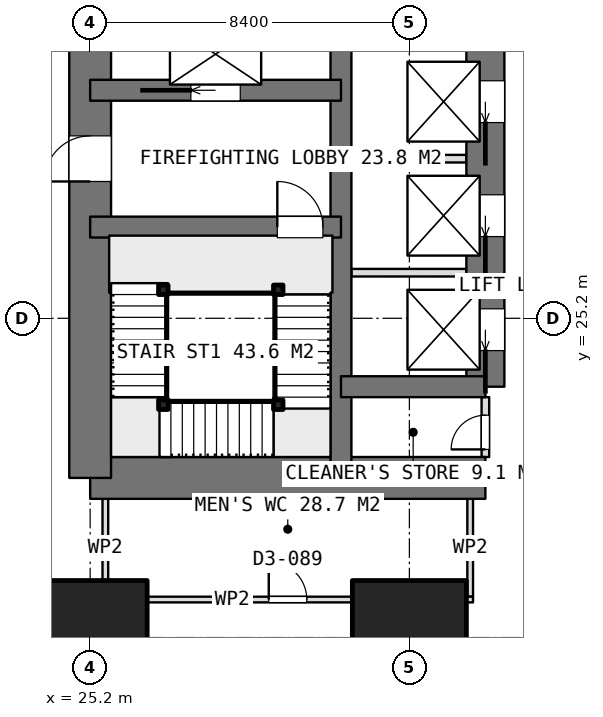
"""IFC4 building model, lengths in metres.
Left out: names, types, materials, properties, quantities, classifications, styles, units other than length and angle.
Written with IfcOpenShell. Run it as: python <this file> out.ifc"""

import sys

from ifc_helpers import new_model, si_unit, direction, frame, frame_2d, origin, origin_2d, place, context, subcontext, project, spatial, rectangle, extrude, element, fill, save


model = new_model("IFC4")
c1 = context("Model", 3, precision=1e-05, world=origin(), true_north=direction((0.0, 1.0)))
c2 = subcontext(c1, "Body", "Model", "MODEL_VIEW")
j1 = project(units=[si_unit("LENGTHUNIT", "METRE"), si_unit("PLANEANGLEUNIT", "RADIAN")], contexts=[c1])
p1 = place(None, origin())
s1 = spatial("IfcSite", under=j1, at=p1, CompositionType="ELEMENT")
p2 = place(p1, origin())
s2 = spatial("IfcBuilding", under=s1, at=p2, CompositionType="ELEMENT")
p3 = place(p2, frame((0.0, 0.0, 81.65)))
s3 = spatial("IfcBuildingStorey", under=s2, at=p3, CompositionType="ELEMENT", Elevation=81.65)
p4 = place(p3, frame((25.2, 21.0, 0.0), z_axis=(0.0, 0.0, 1.0), x_axis=(1.0, 0.0, 0.0)))
e1 = element("IfcWall", 1, at=p4, inside=s3, PredefinedType="SHEAR", context=c2, shape_type="SweptSolid", body=[
    extrude(rectangle(XDim=10.4, YDim=1.1, at=frame_2d((5.2, 0.0))), origin(), (0.0, 0.0, 1.0), 3.75),
])
p5 = place(p3, frame((25.2, 21.0, 0.0), z_axis=(0.0, 0.0, 1.0), x_axis=(0.0, 1.0, 0.0)))
e2 = element("IfcWall", 2, at=p5, inside=s3, PredefinedType="SHEAR", context=c2, shape_type="SweptSolid", body=[
    extrude(rectangle(XDim=25.2, YDim=1.1, at=frame_2d((12.6, 0.0))), origin(), (0.0, 0.0, 1.0), 3.75),
])
p6 = place(p5, frame((7.8, 0.0, 0.0)))
e3 = element("IfcOpeningElement", 3, at=p6, cuts=e2, PredefinedType="OPENING", context=c2, shape_type="SweptSolid", body=[
    extrude(rectangle(XDim=1.2, YDim=2.1, at=frame_2d((0.6, 1.05))), frame((0.0, 0.56, 0.0), z_axis=(0.0, -1.0, 0.0), x_axis=(1.0, 0.0, 0.0)), (0.0, 0.0, 1.0), 1.12),
])
p7 = place(p5, frame((14.25, 0.0, 0.0)))
e4 = element("IfcOpeningElement", 4, at=p7, cuts=e2, PredefinedType="OPENING", context=c2, shape_type="SweptSolid", body=[
    extrude(rectangle(XDim=0.9, YDim=2.1, at=frame_2d((0.45, 1.05))), frame((0.0, 0.56, 0.0), z_axis=(0.0, -1.0, 0.0), x_axis=(1.0, 0.0, 0.0)), (0.0, 0.0, 1.0), 1.12),
])
p8 = place(p5, frame((16.85, 0.0, 0.0)))
e5 = element("IfcOpeningElement", 5, at=p8, cuts=e2, PredefinedType="OPENING", context=c2, shape_type="SweptSolid", body=[
    extrude(rectangle(XDim=0.9, YDim=2.1, at=frame_2d((0.45, 1.05))), frame((0.0, 0.56, 0.0), z_axis=(0.0, -1.0, 0.0), x_axis=(1.0, 0.0, 0.0)), (0.0, 0.0, 1.0), 1.12),
])
p9 = place(p5, frame((19.075, 0.0, 0.0)))
e6 = element("IfcOpeningElement", 6, at=p9, cuts=e2, PredefinedType="OPENING", context=c2, shape_type="SweptSolid", body=[
    extrude(rectangle(XDim=1.2, YDim=2.1, at=frame_2d((0.6, 1.05))), frame((0.0, 0.56, 0.0), z_axis=(0.0, -1.0, 0.0), x_axis=(1.0, 0.0, 0.0)), (0.0, 0.0, 1.0), 1.12),
])
p10 = place(p3, frame((31.8, 21.0, 0.0), z_axis=(0.0, 0.0, 1.0), x_axis=(0.0, 1.0, 0.0)))
e7 = element("IfcWall", 7, at=p10, inside=s3, PredefinedType="SHEAR", context=c2, shape_type="SweptSolid", body=[
    extrude(rectangle(XDim=25.2, YDim=0.55, at=frame_2d((12.6, 0.0))), origin(), (0.0, 0.0, 1.0), 3.75),
])
p11 = place(p3, frame((35.6, 23.4, 0.0), z_axis=(0.0, 0.0, 1.0), x_axis=(0.0, 1.0, 0.0)))
e8 = element("IfcWall", 8, at=p11, inside=s3, PredefinedType="SHEAR", context=c2, shape_type="SweptSolid", body=[
    extrude(rectangle(XDim=18.0, YDim=1.0, at=frame_2d((9.0, 0.0))), origin(), (0.0, 0.0, 1.0), 3.75),
])
p12 = place(p11, frame((0.95, 0.0, 0.0)))
e9 = element("IfcOpeningElement", 9, at=p12, cuts=e8, PredefinedType="OPENING", context=c2, shape_type="SweptSolid", body=[
    extrude(rectangle(XDim=1.1, YDim=2.1, at=frame_2d((0.55, 1.05))), frame((0.0, 0.51, 0.0), z_axis=(0.0, -1.0, 0.0), x_axis=(1.0, 0.0, 0.0)), (0.0, 0.0, 1.0), 1.02),
])
p13 = place(p11, frame((3.95, 0.0, 0.0)))
e10 = element("IfcOpeningElement", 10, at=p13, cuts=e8, PredefinedType="OPENING", context=c2, shape_type="SweptSolid", body=[
    extrude(rectangle(XDim=1.1, YDim=2.1, at=frame_2d((0.55, 1.05))), frame((0.0, 0.51, 0.0), z_axis=(0.0, -1.0, 0.0), x_axis=(1.0, 0.0, 0.0)), (0.0, 0.0, 1.0), 1.02),
])
p14 = place(p11, frame((6.95, 0.0, 0.0)))
e11 = element("IfcOpeningElement", 11, at=p14, cuts=e8, PredefinedType="OPENING", context=c2, shape_type="SweptSolid", body=[
    extrude(rectangle(XDim=1.1, YDim=2.1, at=frame_2d((0.55, 1.05))), frame((0.0, 0.51, 0.0), z_axis=(0.0, -1.0, 0.0), x_axis=(1.0, 0.0, 0.0)), (0.0, 0.0, 1.0), 1.02),
])
p15 = place(p11, frame((9.95, 0.0, 0.0)))
e12 = element("IfcOpeningElement", 12, at=p15, cuts=e8, PredefinedType="OPENING", context=c2, shape_type="SweptSolid", body=[
    extrude(rectangle(XDim=1.1, YDim=2.1, at=frame_2d((0.55, 1.05))), frame((0.0, 0.51, 0.0), z_axis=(0.0, -1.0, 0.0), x_axis=(1.0, 0.0, 0.0)), (0.0, 0.0, 1.0), 1.02),
])
p16 = place(p11, frame((12.95, 0.0, 0.0)))
e13 = element("IfcOpeningElement", 13, at=p16, cuts=e8, PredefinedType="OPENING", context=c2, shape_type="SweptSolid", body=[
    extrude(rectangle(XDim=1.1, YDim=2.1, at=frame_2d((0.55, 1.05))), frame((0.0, 0.51, 0.0), z_axis=(0.0, -1.0, 0.0), x_axis=(1.0, 0.0, 0.0)), (0.0, 0.0, 1.0), 1.02),
])
p17 = place(p11, frame((15.95, 0.0, 0.0)))
e14 = element("IfcOpeningElement", 14, at=p17, cuts=e8, PredefinedType="OPENING", context=c2, shape_type="SweptSolid", body=[
    extrude(rectangle(XDim=1.1, YDim=2.1, at=frame_2d((0.55, 1.05))), frame((0.0, 0.51, 0.0), z_axis=(0.0, -1.0, 0.0), x_axis=(1.0, 0.0, 0.0)), (0.0, 0.0, 1.0), 1.02),
])
p18 = place(p3, frame((31.8, 23.4, 0.0), z_axis=(0.0, 0.0, 1.0), x_axis=(1.0, 0.0, 0.0)))
e15 = element("IfcWall", 15, at=p18, inside=s3, PredefinedType="SHEAR", context=c2, shape_type="SweptSolid", body=[
    extrude(rectangle(XDim=3.8, YDim=0.55, at=frame_2d((1.9, 0.0))), origin(), (0.0, 0.0, 1.0), 3.75),
])
p19 = place(p3, frame((25.2, 27.6, 0.0), z_axis=(0.0, 0.0, 1.0), x_axis=(1.0, 0.0, 0.0)))
e16 = element("IfcWall", 16, at=p19, inside=s3, PredefinedType="SHEAR", context=c2, shape_type="SweptSolid", body=[
    extrude(rectangle(XDim=6.6, YDim=0.55, at=frame_2d((3.3, 0.0))), origin(), (0.0, 0.0, 1.0), 3.75),
])
p20 = place(p19, frame((4.925, 0.0, 0.0)))
e17 = element("IfcOpeningElement", 17, at=p20, cuts=e16, PredefinedType="OPENING", context=c2, shape_type="SweptSolid", body=[
    extrude(rectangle(XDim=1.2, YDim=2.1, at=frame_2d((0.6, 1.05))), frame((0.0, 0.285, 0.0), z_axis=(0.0, -1.0, 0.0), x_axis=(1.0, 0.0, 0.0)), (0.0, 0.0, 1.0), 0.57),
])
p21 = place(p3, frame((25.2, 31.2, 0.0), z_axis=(0.0, 0.0, 1.0), x_axis=(1.0, 0.0, 0.0)))
e18 = element("IfcWall", 18, at=p21, inside=s3, PredefinedType="SHEAR", context=c2, shape_type="SweptSolid", body=[
    extrude(rectangle(XDim=6.6, YDim=0.55, at=frame_2d((3.3, 0.0))), origin(), (0.0, 0.0, 1.0), 3.75),
])
p22 = place(p21, frame((2.65, 0.0, 0.0)))
e19 = element("IfcOpeningElement", 19, at=p22, cuts=e18, PredefinedType="OPENING", context=c2, shape_type="SweptSolid", body=[
    extrude(rectangle(XDim=1.3, YDim=2.1, at=frame_2d((0.65, 1.05))), frame((0.0, 0.285, 0.0), z_axis=(0.0, -1.0, 0.0), x_axis=(1.0, 0.0, 0.0)), (0.0, 0.0, 1.0), 0.57),
])
for number, where, z_axis, x_axis in (
    (20, (25.2, 16.8, 0.0), (0.0, 0.0, 1.0), (1.0, 0.0, 0.0)),
    (21, (33.6, 16.8, 0.0), (0.0, 0.0, 1.0), (1.0, 0.0, 0.0)),
):
    element("IfcColumn", number, at=place(p3, frame(where, z_axis=z_axis, x_axis=x_axis)), inside=s3, PredefinedType="COLUMN", context=c2, shape_type="SweptSolid", body=[
        extrude(rectangle(XDim=3.0, YDim=3.0, at=origin_2d()), origin(), (0.0, 0.0, 1.0), 3.75),
    ])
for number, where, z_axis, x_axis in (
    (22, (32.075, 26.4, 0.0), (0.0, 0.0, 1.0), (1.0, 0.0, 0.0)),
    (23, (32.075, 29.4, 0.0), (0.0, 0.0, 1.0), (1.0, 0.0, 0.0)),
):
    element("IfcWall", number, at=place(p3, frame(where, z_axis=z_axis, x_axis=x_axis)), inside=s3, PredefinedType="PARTITIONING", context=c2, shape_type="SweptSolid", body=[
        extrude(rectangle(XDim=3.025, YDim=0.2, at=frame_2d((1.513, 0.0))), origin(), (0.0, 0.0, 1.0), 3.4),
    ])
p23 = place(p3, frame((35.6, 21.55, 0.0), z_axis=(0.0, 0.0, 1.0), x_axis=(0.0, 1.0, 0.0)))
e24 = element("IfcWall", 24, at=p23, inside=s3, PredefinedType="PARTITIONING", context=c2, shape_type="SweptSolid", body=[
    extrude(rectangle(XDim=1.575, YDim=0.2, at=frame_2d((0.788, 0.0))), origin(), (0.0, 0.0, 1.0), 3.4),
])
p24 = place(p23, frame((0.2, 0.0, 0.0)))
e25 = element("IfcOpeningElement", 25, at=p24, cuts=e24, PredefinedType="OPENING", context=c2, shape_type="SweptSolid", body=[
    extrude(rectangle(XDim=0.9, YDim=2.1, at=frame_2d((0.45, 1.05))), frame((0.0, 0.11, 0.0), z_axis=(0.0, -1.0, 0.0), x_axis=(1.0, 0.0, 0.0)), (0.0, 0.0, 1.0), 0.22),
])
p25 = place(p3, frame((25.525, 17.8, 0.0), z_axis=(0.0, 0.0, 1.0), x_axis=(1.0, 0.0, 0.0)))
e26 = element("IfcWall", 26, at=p25, inside=s3, PredefinedType="PARTITIONING", context=c2, shape_type="SweptSolid", body=[
    extrude(rectangle(XDim=9.75, YDim=0.15, at=frame_2d((4.875, 0.0))), origin(), (0.0, 0.0, 1.0), 3.4),
])
p26 = place(p25, frame((4.375, 0.0, 0.0)))
e27 = element("IfcOpeningElement", 27, at=p26, cuts=e26, PredefinedType="OPENING", context=c2, shape_type="SweptSolid", body=[
    extrude(rectangle(XDim=1.0, YDim=2.1, at=frame_2d((0.5, 1.05))), frame((0.0, 0.085, 0.0), z_axis=(0.0, -1.0, 0.0), x_axis=(1.0, 0.0, 0.0)), (0.0, 0.0, 1.0), 0.17),
])
for number, where, z_axis, x_axis in (
    (28, (25.6, 17.875, 0.0), (0.0, 0.0, 1.0), (0.0, 1.0, 0.0)),
    (29, (35.2, 17.875, 0.0), (0.0, 0.0, 1.0), (0.0, 1.0, 0.0)),
):
    element("IfcWall", number, at=place(p3, frame(where, z_axis=z_axis, x_axis=x_axis)), inside=s3, PredefinedType="PARTITIONING", context=c2, shape_type="SweptSolid", body=[
        extrude(rectangle(XDim=2.575, YDim=0.15, at=frame_2d((1.288, 0.0))), origin(), (0.0, 0.0, 1.0), 3.4),
    ])
for number, where, z_axis, x_axis in (
    (30, (30.15, 25.95, 0.0), (0.0, 0.0, 1.0), (1.0, 0.0, 0.0)),
    (31, (30.15, 22.925, 0.0), (0.0, 0.0, 1.0), (1.0, 0.0, 0.0)),
    (32, (27.125, 22.925, 0.0), (0.0, 0.0, 1.0), (1.0, 0.0, 0.0)),
    (33, (27.125, 25.95, 0.0), (0.0, 0.0, 1.0), (1.0, 0.0, 0.0)),
):
    element("IfcColumn", number, at=place(p3, frame(where, z_axis=z_axis, x_axis=x_axis)), inside=s3, PredefinedType="COLUMN", context=c2, shape_type="SweptSolid", body=[
        extrude(rectangle(XDim=0.25, YDim=0.25, at=origin_2d()), origin(), (0.0, 0.0, 1.0), 3.75),
    ])
p27 = place(p6, origin())
e34 = element("IfcDoor", 34, at=p27, inside=s3, OperationType="SINGLE_SWING_LEFT", PredefinedType="DOOR", context=c2, shape_type="SweptSolid", body=[
    extrude(rectangle(XDim=1.2, YDim=2.1, at=frame_2d((0.6, 1.05))), frame((0.0, 0.025, 0.0), z_axis=(0.0, -1.0, 0.0), x_axis=(1.0, 0.0, 0.0)), (0.0, 0.0, 1.0), 0.05),
])
fill(e3, e34)
p28 = place(p24, origin())
e35 = element("IfcDoor", 35, at=p28, inside=s3, OperationType="SINGLE_SWING_LEFT", PredefinedType="DOOR", context=c2, shape_type="SweptSolid", body=[
    extrude(rectangle(XDim=0.9, YDim=2.1, at=frame_2d((0.45, 1.05))), frame((0.0, 0.025, 0.0), z_axis=(0.0, -1.0, 0.0), x_axis=(1.0, 0.0, 0.0)), (0.0, 0.0, 1.0), 0.05),
])
fill(e25, e35)
p29 = place(p12, origin())
e36 = element("IfcDoor", 36, at=p29, inside=s3, OperationType="SLIDING_TO_LEFT", PredefinedType="USERDEFINED", context=c2, shape_type="SweptSolid", body=[
    extrude(rectangle(XDim=1.1, YDim=2.1, at=frame_2d((0.55, 1.05))), frame((0.0, 0.025, 0.0), z_axis=(0.0, -1.0, 0.0), x_axis=(1.0, 0.0, 0.0)), (0.0, 0.0, 1.0), 0.05),
])
fill(e9, e36)
p30 = place(p13, origin())
e37 = element("IfcDoor", 37, at=p30, inside=s3, OperationType="SLIDING_TO_LEFT", PredefinedType="USERDEFINED", context=c2, shape_type="SweptSolid", body=[
    extrude(rectangle(XDim=1.1, YDim=2.1, at=frame_2d((0.55, 1.05))), frame((0.0, 0.025, 0.0), z_axis=(0.0, -1.0, 0.0), x_axis=(1.0, 0.0, 0.0)), (0.0, 0.0, 1.0), 0.05),
])
fill(e10, e37)
p31 = place(p14, origin())
e38 = element("IfcDoor", 38, at=p31, inside=s3, OperationType="SLIDING_TO_LEFT", PredefinedType="USERDEFINED", context=c2, shape_type="SweptSolid", body=[
    extrude(rectangle(XDim=1.1, YDim=2.1, at=frame_2d((0.55, 1.05))), frame((0.0, 0.025, 0.0), z_axis=(0.0, -1.0, 0.0), x_axis=(1.0, 0.0, 0.0)), (0.0, 0.0, 1.0), 0.05),
])
fill(e11, e38)
p32 = place(p22, origin())
e39 = element("IfcDoor", 39, at=p32, inside=s3, OperationType="SLIDING_TO_LEFT", PredefinedType="USERDEFINED", context=c2, shape_type="SweptSolid", body=[
    extrude(rectangle(XDim=1.3, YDim=2.1, at=frame_2d((0.65, 1.05))), frame((0.0, 0.025, 0.0), z_axis=(0.0, -1.0, 0.0), x_axis=(1.0, 0.0, 0.0)), (0.0, 0.0, 1.0), 0.05),
])
fill(e19, e39)
p33 = place(p26, origin())
e40 = element("IfcDoor", 40, at=p33, inside=s3, OperationType="SINGLE_SWING_LEFT", PredefinedType="DOOR", context=c2, shape_type="SweptSolid", body=[
    extrude(rectangle(XDim=1.0, YDim=2.1, at=frame_2d((0.5, 1.05))), frame((0.0, 0.025, 0.0), z_axis=(0.0, -1.0, 0.0), x_axis=(1.0, 0.0, 0.0)), (0.0, 0.0, 1.0), 0.05),
])
fill(e27, e40)
p34 = place(p20, origin())
e41 = element("IfcDoor", 41, at=p34, inside=s3, OperationType="SINGLE_SWING_RIGHT", PredefinedType="DOOR", context=c2, shape_type="SweptSolid", body=[
    extrude(rectangle(XDim=1.2, YDim=2.1, at=frame_2d((0.6, 1.05))), frame((0.0, 0.025, 0.0), z_axis=(0.0, -1.0, 0.0), x_axis=(1.0, 0.0, 0.0)), (0.0, 0.0, 1.0), 0.05),
])
fill(e17, e41)
save(model, sys.argv[1])
